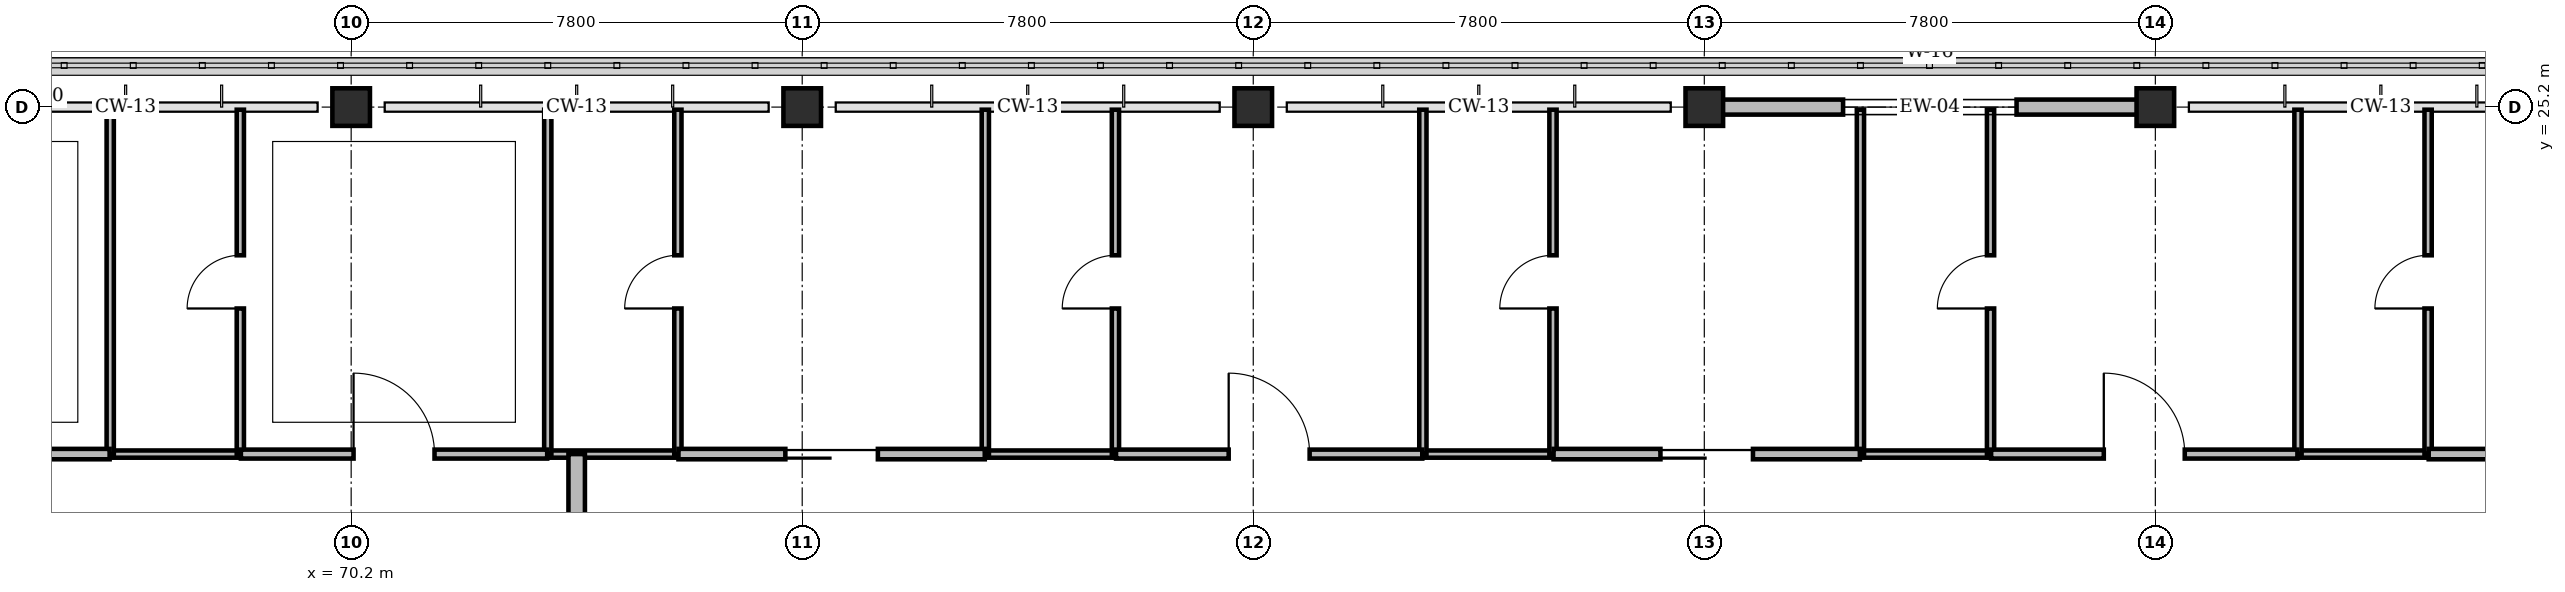
"""IFC4 building model, lengths in metres.
Left out: names, types, materials, properties, quantities, classifications, styles, units other than length and angle.
Written with IfcOpenShell. Run it as: python <this file> out.ifc"""

import sys

from ifc_helpers import new_model, si_unit, direction, frame, frame_2d, origin, origin_2d, place, context, subcontext, project, spatial, rectangle, extrude, element, fill, save


model = new_model("IFC4")
c1 = context("Model", 3, precision=1e-05, world=origin(), true_north=direction((0.0, 1.0)))
c2 = subcontext(c1, "Body", "Model", "MODEL_VIEW")
j1 = project(units=[si_unit("LENGTHUNIT", "METRE"), si_unit("PLANEANGLEUNIT", "RADIAN")], contexts=[c1])
p1 = place(None, origin())
s1 = spatial("IfcSite", under=j1, at=p1, CompositionType="ELEMENT")
p2 = place(p1, origin())
s2 = spatial("IfcBuilding", under=s1, at=p2, CompositionType="ELEMENT")
p3 = place(p2, frame((0.0, 0.0, 18.0)))
s3 = spatial("IfcBuildingStorey", under=s2, at=p3, CompositionType="ELEMENT", Elevation=18.0)
for number, where, z_axis, x_axis in (
    (1, (70.2, 25.2, 0.0), (0.0, 0.0, 1.0), (1.0, 0.0, 0.0)),
    (2, (78.0, 25.2, 0.0), (0.0, 0.0, 1.0), (1.0, 0.0, 0.0)),
    (3, (85.8, 25.2, 0.0), (0.0, 0.0, 1.0), (1.0, 0.0, 0.0)),
    (4, (93.6, 25.2, 0.0), (0.0, 0.0, 1.0), (1.0, 0.0, 0.0)),
    (5, (101.4, 25.2, 0.0), (0.0, 0.0, 1.0), (1.0, 0.0, 0.0)),
):
    element("IfcColumn", number, at=place(p3, frame(where, z_axis=z_axis, x_axis=x_axis)), inside=s3, PredefinedType="COLUMN", context=c2, shape_type="SweptSolid", body=[
        extrude(rectangle(XDim=0.65, YDim=0.65, at=origin_2d()), origin(), (0.0, 0.0, 1.0), 4.2),
    ])
p4 = place(p3, frame((93.89, 25.2, 0.0), z_axis=(0.0, 0.0, 1.0), x_axis=(1.0, 0.0, 0.0)))
e6 = element("IfcWall", 6, at=p4, inside=s3, PredefinedType="STANDARD", context=c2, shape_type="SweptSolid", body=[
    extrude(rectangle(XDim=7.22, YDim=0.26, at=frame_2d((3.61, 0.0))), origin(), (0.0, 0.0, 1.0), 3.255),
])
p5 = place(p4, frame((2.11, 0.0, 0.85)))
e7 = element("IfcOpeningElement", 7, at=p5, cuts=e6, PredefinedType="OPENING", context=c2, shape_type="SweptSolid", body=[
    extrude(rectangle(XDim=3.0, YDim=1.8, at=frame_2d((1.5, 0.9))), frame((0.0, 0.14, 0.0), z_axis=(0.0, -1.0, 0.0), x_axis=(1.0, 0.0, 0.0)), (0.0, 0.0, 1.0), 0.28),
])
p6 = place(p3, frame((66.033, 19.2, 0.0), z_axis=(0.0, 0.0, 1.0), x_axis=(1.0, 0.0, 0.0)))
e8 = element("IfcWall", 8, at=p6, inside=s3, PredefinedType="PARTITIONING", context=c2, shape_type="SweptSolid", body=[
    extrude(rectangle(XDim=2.25, YDim=0.125, at=frame_2d((1.125, 0.0))), origin(), (0.0, 0.0, 1.0), 3.9),
])
p7 = place(p3, frame((66.033, 19.2, 0.0), z_axis=(0.0, 0.0, 1.0), x_axis=(0.0, 1.0, 0.0)))
e9 = element("IfcWall", 9, at=p7, inside=s3, PredefinedType="PARTITIONING", context=c2, shape_type="SweptSolid", body=[
    extrude(rectangle(XDim=5.955, YDim=0.125, at=frame_2d((2.978, 0.0))), origin(), (0.0, 0.0, 1.0), 3.9),
])
p8 = place(p3, frame((68.283, 19.2, 0.0), z_axis=(0.0, 0.0, 1.0), x_axis=(0.0, 1.0, 0.0)))
e10 = element("IfcWall", 10, at=p8, inside=s3, PredefinedType="PARTITIONING", context=c2, shape_type="SweptSolid", body=[
    extrude(rectangle(XDim=5.955, YDim=0.125, at=frame_2d((2.978, 0.0))), origin(), (0.0, 0.0, 1.0), 3.9),
])
p9 = place(p8, frame((2.518, 0.0, 0.0)))
e11 = element("IfcOpeningElement", 11, at=p9, cuts=e10, PredefinedType="OPENING", context=c2, shape_type="SweptSolid", body=[
    extrude(rectangle(XDim=0.92, YDim=2.1, at=frame_2d((0.46, 1.05))), frame((0.0, 0.073, 0.0), z_axis=(0.0, -1.0, 0.0), x_axis=(1.0, 0.0, 0.0)), (0.0, 0.0, 1.0), 0.145),
])
p10 = place(p3, frame((73.6, 19.2, 0.0), z_axis=(0.0, 0.0, 1.0), x_axis=(1.0, 0.0, 0.0)))
e12 = element("IfcWall", 12, at=p10, inside=s3, PredefinedType="PARTITIONING", context=c2, shape_type="SweptSolid", body=[
    extrude(rectangle(XDim=2.25, YDim=0.125, at=frame_2d((1.125, 0.0))), origin(), (0.0, 0.0, 1.0), 3.9),
])
p11 = place(p3, frame((73.6, 19.2, 0.0), z_axis=(0.0, 0.0, 1.0), x_axis=(0.0, 1.0, 0.0)))
e13 = element("IfcWall", 13, at=p11, inside=s3, PredefinedType="PARTITIONING", context=c2, shape_type="SweptSolid", body=[
    extrude(rectangle(XDim=5.955, YDim=0.125, at=frame_2d((2.978, 0.0))), origin(), (0.0, 0.0, 1.0), 3.9),
])
p12 = place(p3, frame((75.85, 19.2, 0.0), z_axis=(0.0, 0.0, 1.0), x_axis=(0.0, 1.0, 0.0)))
e14 = element("IfcWall", 14, at=p12, inside=s3, PredefinedType="PARTITIONING", context=c2, shape_type="SweptSolid", body=[
    extrude(rectangle(XDim=5.955, YDim=0.125, at=frame_2d((2.978, 0.0))), origin(), (0.0, 0.0, 1.0), 3.9),
])
p13 = place(p12, frame((2.518, 0.0, 0.0)))
e15 = element("IfcOpeningElement", 15, at=p13, cuts=e14, PredefinedType="OPENING", context=c2, shape_type="SweptSolid", body=[
    extrude(rectangle(XDim=0.92, YDim=2.1, at=frame_2d((0.46, 1.05))), frame((0.0, 0.073, 0.0), z_axis=(0.0, -1.0, 0.0), x_axis=(1.0, 0.0, 0.0)), (0.0, 0.0, 1.0), 0.145),
])
p14 = place(p3, frame((81.167, 19.2, 0.0), z_axis=(0.0, 0.0, 1.0), x_axis=(1.0, 0.0, 0.0)))
e16 = element("IfcWall", 16, at=p14, inside=s3, PredefinedType="PARTITIONING", context=c2, shape_type="SweptSolid", body=[
    extrude(rectangle(XDim=2.25, YDim=0.125, at=frame_2d((1.125, 0.0))), origin(), (0.0, 0.0, 1.0), 3.9),
])
p15 = place(p3, frame((81.167, 19.2, 0.0), z_axis=(0.0, 0.0, 1.0), x_axis=(0.0, 1.0, 0.0)))
e17 = element("IfcWall", 17, at=p15, inside=s3, PredefinedType="PARTITIONING", context=c2, shape_type="SweptSolid", body=[
    extrude(rectangle(XDim=5.955, YDim=0.125, at=frame_2d((2.978, 0.0))), origin(), (0.0, 0.0, 1.0), 3.9),
])
p16 = place(p3, frame((83.417, 19.2, 0.0), z_axis=(0.0, 0.0, 1.0), x_axis=(0.0, 1.0, 0.0)))
e18 = element("IfcWall", 18, at=p16, inside=s3, PredefinedType="PARTITIONING", context=c2, shape_type="SweptSolid", body=[
    extrude(rectangle(XDim=5.955, YDim=0.125, at=frame_2d((2.978, 0.0))), origin(), (0.0, 0.0, 1.0), 3.9),
])
p17 = place(p16, frame((2.518, 0.0, 0.0)))
e19 = element("IfcOpeningElement", 19, at=p17, cuts=e18, PredefinedType="OPENING", context=c2, shape_type="SweptSolid", body=[
    extrude(rectangle(XDim=0.92, YDim=2.1, at=frame_2d((0.46, 1.05))), frame((0.0, 0.073, 0.0), z_axis=(0.0, -1.0, 0.0), x_axis=(1.0, 0.0, 0.0)), (0.0, 0.0, 1.0), 0.145),
])
p18 = place(p3, frame((88.733, 19.2, 0.0), z_axis=(0.0, 0.0, 1.0), x_axis=(1.0, 0.0, 0.0)))
e20 = element("IfcWall", 20, at=p18, inside=s3, PredefinedType="PARTITIONING", context=c2, shape_type="SweptSolid", body=[
    extrude(rectangle(XDim=2.25, YDim=0.125, at=frame_2d((1.125, 0.0))), origin(), (0.0, 0.0, 1.0), 3.9),
])
p19 = place(p3, frame((88.733, 19.2, 0.0), z_axis=(0.0, 0.0, 1.0), x_axis=(0.0, 1.0, 0.0)))
e21 = element("IfcWall", 21, at=p19, inside=s3, PredefinedType="PARTITIONING", context=c2, shape_type="SweptSolid", body=[
    extrude(rectangle(XDim=5.955, YDim=0.125, at=frame_2d((2.978, 0.0))), origin(), (0.0, 0.0, 1.0), 3.9),
])
p20 = place(p3, frame((90.983, 19.2, 0.0), z_axis=(0.0, 0.0, 1.0), x_axis=(0.0, 1.0, 0.0)))
e22 = element("IfcWall", 22, at=p20, inside=s3, PredefinedType="PARTITIONING", context=c2, shape_type="SweptSolid", body=[
    extrude(rectangle(XDim=5.955, YDim=0.125, at=frame_2d((2.978, 0.0))), origin(), (0.0, 0.0, 1.0), 3.9),
])
p21 = place(p20, frame((2.518, 0.0, 0.0)))
e23 = element("IfcOpeningElement", 23, at=p21, cuts=e22, PredefinedType="OPENING", context=c2, shape_type="SweptSolid", body=[
    extrude(rectangle(XDim=0.92, YDim=2.1, at=frame_2d((0.46, 1.05))), frame((0.0, 0.073, 0.0), z_axis=(0.0, -1.0, 0.0), x_axis=(1.0, 0.0, 0.0)), (0.0, 0.0, 1.0), 0.145),
])
p22 = place(p3, frame((96.3, 19.2, 0.0), z_axis=(0.0, 0.0, 1.0), x_axis=(1.0, 0.0, 0.0)))
e24 = element("IfcWall", 24, at=p22, inside=s3, PredefinedType="PARTITIONING", context=c2, shape_type="SweptSolid", body=[
    extrude(rectangle(XDim=2.25, YDim=0.125, at=frame_2d((1.125, 0.0))), origin(), (0.0, 0.0, 1.0), 3.9),
])
p23 = place(p3, frame((96.3, 19.2, 0.0), z_axis=(0.0, 0.0, 1.0), x_axis=(0.0, 1.0, 0.0)))
e25 = element("IfcWall", 25, at=p23, inside=s3, PredefinedType="PARTITIONING", context=c2, shape_type="SweptSolid", body=[
    extrude(rectangle(XDim=5.955, YDim=0.125, at=frame_2d((2.978, 0.0))), origin(), (0.0, 0.0, 1.0), 3.9),
])
p24 = place(p3, frame((98.55, 19.2, 0.0), z_axis=(0.0, 0.0, 1.0), x_axis=(0.0, 1.0, 0.0)))
e26 = element("IfcWall", 26, at=p24, inside=s3, PredefinedType="PARTITIONING", context=c2, shape_type="SweptSolid", body=[
    extrude(rectangle(XDim=5.955, YDim=0.125, at=frame_2d((2.978, 0.0))), origin(), (0.0, 0.0, 1.0), 3.9),
])
p25 = place(p24, frame((2.518, 0.0, 0.0)))
e27 = element("IfcOpeningElement", 27, at=p25, cuts=e26, PredefinedType="OPENING", context=c2, shape_type="SweptSolid", body=[
    extrude(rectangle(XDim=0.92, YDim=2.1, at=frame_2d((0.46, 1.05))), frame((0.0, 0.073, 0.0), z_axis=(0.0, -1.0, 0.0), x_axis=(1.0, 0.0, 0.0)), (0.0, 0.0, 1.0), 0.145),
])
p26 = place(p3, frame((103.867, 19.2, 0.0), z_axis=(0.0, 0.0, 1.0), x_axis=(1.0, 0.0, 0.0)))
e28 = element("IfcWall", 28, at=p26, inside=s3, PredefinedType="PARTITIONING", context=c2, shape_type="SweptSolid", body=[
    extrude(rectangle(XDim=2.25, YDim=0.125, at=frame_2d((1.125, 0.0))), origin(), (0.0, 0.0, 1.0), 3.9),
])
p27 = place(p3, frame((103.867, 19.2, 0.0), z_axis=(0.0, 0.0, 1.0), x_axis=(0.0, 1.0, 0.0)))
e29 = element("IfcWall", 29, at=p27, inside=s3, PredefinedType="PARTITIONING", context=c2, shape_type="SweptSolid", body=[
    extrude(rectangle(XDim=5.955, YDim=0.125, at=frame_2d((2.978, 0.0))), origin(), (0.0, 0.0, 1.0), 3.9),
])
p28 = place(p3, frame((106.117, 19.2, 0.0), z_axis=(0.0, 0.0, 1.0), x_axis=(0.0, 1.0, 0.0)))
e30 = element("IfcWall", 30, at=p28, inside=s3, PredefinedType="PARTITIONING", context=c2, shape_type="SweptSolid", body=[
    extrude(rectangle(XDim=5.955, YDim=0.125, at=frame_2d((2.978, 0.0))), origin(), (0.0, 0.0, 1.0), 3.9),
])
p29 = place(p28, frame((2.518, 0.0, 0.0)))
e31 = element("IfcOpeningElement", 31, at=p29, cuts=e30, PredefinedType="OPENING", context=c2, shape_type="SweptSolid", body=[
    extrude(rectangle(XDim=0.92, YDim=2.1, at=frame_2d((0.46, 1.05))), frame((0.0, 0.073, 0.0), z_axis=(0.0, -1.0, 0.0), x_axis=(1.0, 0.0, 0.0)), (0.0, 0.0, 1.0), 0.145),
])
p30 = place(p3, frame((60.727, 19.2, 0.0), z_axis=(0.0, 0.0, 1.0), x_axis=(1.0, 0.0, 0.0)))
e32 = element("IfcWall", 32, at=p30, inside=s3, PredefinedType="PARTITIONING", context=c2, shape_type="SweptSolid", body=[
    extrude(rectangle(XDim=5.296, YDim=0.18, at=frame_2d((2.648, 0.0))), origin(), (0.0, 0.0, 1.0), 3.9),
])
p31 = place(p30, frame((1.848, 0.0, 0.0)))
e33 = element("IfcOpeningElement", 33, at=p31, cuts=e32, PredefinedType="OPENING", context=c2, shape_type="SweptSolid", body=[
    extrude(rectangle(XDim=1.6, YDim=2.25, at=frame_2d((0.8, 1.125))), frame((0.0, 0.1, 0.0), z_axis=(0.0, -1.0, 0.0), x_axis=(1.0, 0.0, 0.0)), (0.0, 0.0, 1.0), 0.2),
])
p32 = place(p3, frame((68.293, 19.2, 0.0), z_axis=(0.0, 0.0, 1.0), x_axis=(1.0, 0.0, 0.0)))
e34 = element("IfcWall", 34, at=p32, inside=s3, PredefinedType="PARTITIONING", context=c2, shape_type="SweptSolid", body=[
    extrude(rectangle(XDim=5.297, YDim=0.155, at=frame_2d((2.648, 0.0))), origin(), (0.0, 0.0, 1.0), 3.9),
])
p33 = place(p32, frame((1.948, 0.0, 0.0)))
e35 = element("IfcOpeningElement", 35, at=p33, cuts=e34, PredefinedType="OPENING", context=c2, shape_type="SweptSolid", body=[
    extrude(rectangle(XDim=1.4, YDim=2.2, at=frame_2d((0.7, 1.1))), frame((0.0, 0.087, 0.0), z_axis=(0.0, -1.0, 0.0), x_axis=(1.0, 0.0, 0.0)), (0.0, 0.0, 1.0), 0.175),
])
p34 = place(p3, frame((75.86, 19.2, 0.0), z_axis=(0.0, 0.0, 1.0), x_axis=(1.0, 0.0, 0.0)))
e36 = element("IfcWall", 36, at=p34, inside=s3, PredefinedType="PARTITIONING", context=c2, shape_type="SweptSolid", body=[
    extrude(rectangle(XDim=5.297, YDim=0.18, at=frame_2d((2.648, 0.0))), origin(), (0.0, 0.0, 1.0), 3.9),
])
p35 = place(p34, frame((1.848, 0.0, 0.0)))
e37 = element("IfcOpeningElement", 37, at=p35, cuts=e36, PredefinedType="OPENING", context=c2, shape_type="SweptSolid", body=[
    extrude(rectangle(XDim=1.6, YDim=2.25, at=frame_2d((0.8, 1.125))), frame((0.0, 0.1, 0.0), z_axis=(0.0, -1.0, 0.0), x_axis=(1.0, 0.0, 0.0)), (0.0, 0.0, 1.0), 0.2),
])
p36 = place(p3, frame((83.427, 19.2, 0.0), z_axis=(0.0, 0.0, 1.0), x_axis=(1.0, 0.0, 0.0)))
e38 = element("IfcWall", 38, at=p36, inside=s3, PredefinedType="PARTITIONING", context=c2, shape_type="SweptSolid", body=[
    extrude(rectangle(XDim=5.296, YDim=0.155, at=frame_2d((2.648, 0.0))), origin(), (0.0, 0.0, 1.0), 3.9),
])
p37 = place(p36, frame((1.948, 0.0, 0.0)))
e39 = element("IfcOpeningElement", 39, at=p37, cuts=e38, PredefinedType="OPENING", context=c2, shape_type="SweptSolid", body=[
    extrude(rectangle(XDim=1.4, YDim=2.2, at=frame_2d((0.7, 1.1))), frame((0.0, 0.087, 0.0), z_axis=(0.0, -1.0, 0.0), x_axis=(1.0, 0.0, 0.0)), (0.0, 0.0, 1.0), 0.175),
])
p38 = place(p3, frame((90.993, 19.2, 0.0), z_axis=(0.0, 0.0, 1.0), x_axis=(1.0, 0.0, 0.0)))
e40 = element("IfcWall", 40, at=p38, inside=s3, PredefinedType="PARTITIONING", context=c2, shape_type="SweptSolid", body=[
    extrude(rectangle(XDim=5.297, YDim=0.18, at=frame_2d((2.648, 0.0))), origin(), (0.0, 0.0, 1.0), 3.9),
])
p39 = place(p38, frame((1.848, 0.0, 0.0)))
e41 = element("IfcOpeningElement", 41, at=p39, cuts=e40, PredefinedType="OPENING", context=c2, shape_type="SweptSolid", body=[
    extrude(rectangle(XDim=1.6, YDim=2.25, at=frame_2d((0.8, 1.125))), frame((0.0, 0.1, 0.0), z_axis=(0.0, -1.0, 0.0), x_axis=(1.0, 0.0, 0.0)), (0.0, 0.0, 1.0), 0.2),
])
p40 = place(p3, frame((98.56, 19.2, 0.0), z_axis=(0.0, 0.0, 1.0), x_axis=(1.0, 0.0, 0.0)))
e42 = element("IfcWall", 42, at=p40, inside=s3, PredefinedType="PARTITIONING", context=c2, shape_type="SweptSolid", body=[
    extrude(rectangle(XDim=5.297, YDim=0.155, at=frame_2d((2.648, 0.0))), origin(), (0.0, 0.0, 1.0), 3.9),
])
p41 = place(p40, frame((1.948, 0.0, 0.0)))
e43 = element("IfcOpeningElement", 43, at=p41, cuts=e42, PredefinedType="OPENING", context=c2, shape_type="SweptSolid", body=[
    extrude(rectangle(XDim=1.4, YDim=2.2, at=frame_2d((0.7, 1.1))), frame((0.0, 0.087, 0.0), z_axis=(0.0, -1.0, 0.0), x_axis=(1.0, 0.0, 0.0)), (0.0, 0.0, 1.0), 0.175),
])
p42 = place(p3, frame((106.127, 19.2, 0.0), z_axis=(0.0, 0.0, 1.0), x_axis=(1.0, 0.0, 0.0)))
e44 = element("IfcWall", 44, at=p42, inside=s3, PredefinedType="PARTITIONING", context=c2, shape_type="SweptSolid", body=[
    extrude(rectangle(XDim=5.296, YDim=0.18, at=frame_2d((2.648, 0.0))), origin(), (0.0, 0.0, 1.0), 3.9),
])
p43 = place(p42, frame((1.848, 0.0, 0.0)))
e45 = element("IfcOpeningElement", 45, at=p43, cuts=e44, PredefinedType="OPENING", context=c2, shape_type="SweptSolid", body=[
    extrude(rectangle(XDim=1.6, YDim=2.25, at=frame_2d((0.8, 1.125))), frame((0.0, 0.1, 0.0), z_axis=(0.0, -1.0, 0.0), x_axis=(1.0, 0.0, 0.0)), (0.0, 0.0, 1.0), 0.2),
])
p44 = place(p3, frame((74.1, 16.8, 0.0), z_axis=(0.0, 0.0, 1.0), x_axis=(0.0, 1.0, 0.0)))
e46 = element("IfcWall", 46, at=p44, inside=s3, PredefinedType="STANDARD", context=c2, shape_type="SweptSolid", body=[
    extrude(rectangle(XDim=2.4, YDim=0.285, at=frame_2d((1.2, 0.0))), origin(), (0.0, 0.0, 1.0), 3.9),
])
p45 = place(p5, origin())
e47 = element("IfcWindow", 47, at=p45, inside=s3, PartitioningType="SINGLE_PANEL", PredefinedType="WINDOW", context=c2, shape_type="SweptSolid", body=[
    extrude(rectangle(XDim=3.0, YDim=1.8, at=frame_2d((1.5, 0.9))), frame((0.0, 0.03, 0.0), z_axis=(0.0, -1.0, 0.0), x_axis=(1.0, 0.0, 0.0)), (0.0, 0.0, 1.0), 0.06),
])
fill(e7, e47)
p46 = place(p9, origin())
e48 = element("IfcDoor", 48, at=p46, inside=s3, OperationType="SINGLE_SWING_LEFT", PredefinedType="DOOR", context=c2, shape_type="SweptSolid", body=[
    extrude(rectangle(XDim=0.92, YDim=2.1, at=frame_2d((0.46, 1.05))), frame((0.0, 0.025, 0.0), z_axis=(0.0, -1.0, 0.0), x_axis=(1.0, 0.0, 0.0)), (0.0, 0.0, 1.0), 0.05),
])
fill(e11, e48)
p47 = place(p13, origin())
e49 = element("IfcDoor", 49, at=p47, inside=s3, OperationType="SINGLE_SWING_LEFT", PredefinedType="DOOR", context=c2, shape_type="SweptSolid", body=[
    extrude(rectangle(XDim=0.92, YDim=2.1, at=frame_2d((0.46, 1.05))), frame((0.0, 0.025, 0.0), z_axis=(0.0, -1.0, 0.0), x_axis=(1.0, 0.0, 0.0)), (0.0, 0.0, 1.0), 0.05),
])
fill(e15, e49)
p48 = place(p17, origin())
e50 = element("IfcDoor", 50, at=p48, inside=s3, OperationType="SINGLE_SWING_LEFT", PredefinedType="DOOR", context=c2, shape_type="SweptSolid", body=[
    extrude(rectangle(XDim=0.92, YDim=2.1, at=frame_2d((0.46, 1.05))), frame((0.0, 0.025, 0.0), z_axis=(0.0, -1.0, 0.0), x_axis=(1.0, 0.0, 0.0)), (0.0, 0.0, 1.0), 0.05),
])
fill(e19, e50)
p49 = place(p21, origin())
e51 = element("IfcDoor", 51, at=p49, inside=s3, OperationType="SINGLE_SWING_LEFT", PredefinedType="DOOR", context=c2, shape_type="SweptSolid", body=[
    extrude(rectangle(XDim=0.92, YDim=2.1, at=frame_2d((0.46, 1.05))), frame((0.0, 0.025, 0.0), z_axis=(0.0, -1.0, 0.0), x_axis=(1.0, 0.0, 0.0)), (0.0, 0.0, 1.0), 0.05),
])
fill(e23, e51)
p50 = place(p25, origin())
e52 = element("IfcDoor", 52, at=p50, inside=s3, OperationType="SINGLE_SWING_LEFT", PredefinedType="DOOR", context=c2, shape_type="SweptSolid", body=[
    extrude(rectangle(XDim=0.92, YDim=2.1, at=frame_2d((0.46, 1.05))), frame((0.0, 0.025, 0.0), z_axis=(0.0, -1.0, 0.0), x_axis=(1.0, 0.0, 0.0)), (0.0, 0.0, 1.0), 0.05),
])
fill(e27, e52)
p51 = place(p29, origin())
e53 = element("IfcDoor", 53, at=p51, inside=s3, OperationType="SINGLE_SWING_LEFT", PredefinedType="DOOR", context=c2, shape_type="SweptSolid", body=[
    extrude(rectangle(XDim=0.92, YDim=2.1, at=frame_2d((0.46, 1.05))), frame((0.0, 0.025, 0.0), z_axis=(0.0, -1.0, 0.0), x_axis=(1.0, 0.0, 0.0)), (0.0, 0.0, 1.0), 0.05),
])
fill(e31, e53)
p52 = place(p33, origin())
e54 = element("IfcDoor", 54, at=p52, inside=s3, OperationType="SINGLE_SWING_LEFT", PredefinedType="DOOR", context=c2, shape_type="SweptSolid", body=[
    extrude(rectangle(XDim=1.4, YDim=2.2, at=frame_2d((0.7, 1.1))), frame((0.0, 0.025, 0.0), z_axis=(0.0, -1.0, 0.0), x_axis=(1.0, 0.0, 0.0)), (0.0, 0.0, 1.0), 0.05),
])
fill(e35, e54)
p53 = place(p35, origin())
e55 = element("IfcDoor", 55, at=p53, inside=s3, OperationType="SLIDING_TO_RIGHT", PredefinedType="DOOR", context=c2, shape_type="SweptSolid", body=[
    extrude(rectangle(XDim=1.6, YDim=2.25, at=frame_2d((0.8, 1.125))), frame((0.0, 0.025, 0.0), z_axis=(0.0, -1.0, 0.0), x_axis=(1.0, 0.0, 0.0)), (0.0, 0.0, 1.0), 0.05),
])
fill(e37, e55)
p54 = place(p37, origin())
e56 = element("IfcDoor", 56, at=p54, inside=s3, OperationType="SINGLE_SWING_LEFT", PredefinedType="DOOR", context=c2, shape_type="SweptSolid", body=[
    extrude(rectangle(XDim=1.4, YDim=2.2, at=frame_2d((0.7, 1.1))), frame((0.0, 0.025, 0.0), z_axis=(0.0, -1.0, 0.0), x_axis=(1.0, 0.0, 0.0)), (0.0, 0.0, 1.0), 0.05),
])
fill(e39, e56)
p55 = place(p39, origin())
e57 = element("IfcDoor", 57, at=p55, inside=s3, OperationType="SLIDING_TO_RIGHT", PredefinedType="DOOR", context=c2, shape_type="SweptSolid", body=[
    extrude(rectangle(XDim=1.6, YDim=2.25, at=frame_2d((0.8, 1.125))), frame((0.0, 0.025, 0.0), z_axis=(0.0, -1.0, 0.0), x_axis=(1.0, 0.0, 0.0)), (0.0, 0.0, 1.0), 0.05),
])
fill(e41, e57)
p56 = place(p41, origin())
e58 = element("IfcDoor", 58, at=p56, inside=s3, OperationType="SINGLE_SWING_LEFT", PredefinedType="DOOR", context=c2, shape_type="SweptSolid", body=[
    extrude(rectangle(XDim=1.4, YDim=2.2, at=frame_2d((0.7, 1.1))), frame((0.0, 0.025, 0.0), z_axis=(0.0, -1.0, 0.0), x_axis=(1.0, 0.0, 0.0)), (0.0, 0.0, 1.0), 0.05),
])
fill(e43, e58)
save(model, sys.argv[1])
